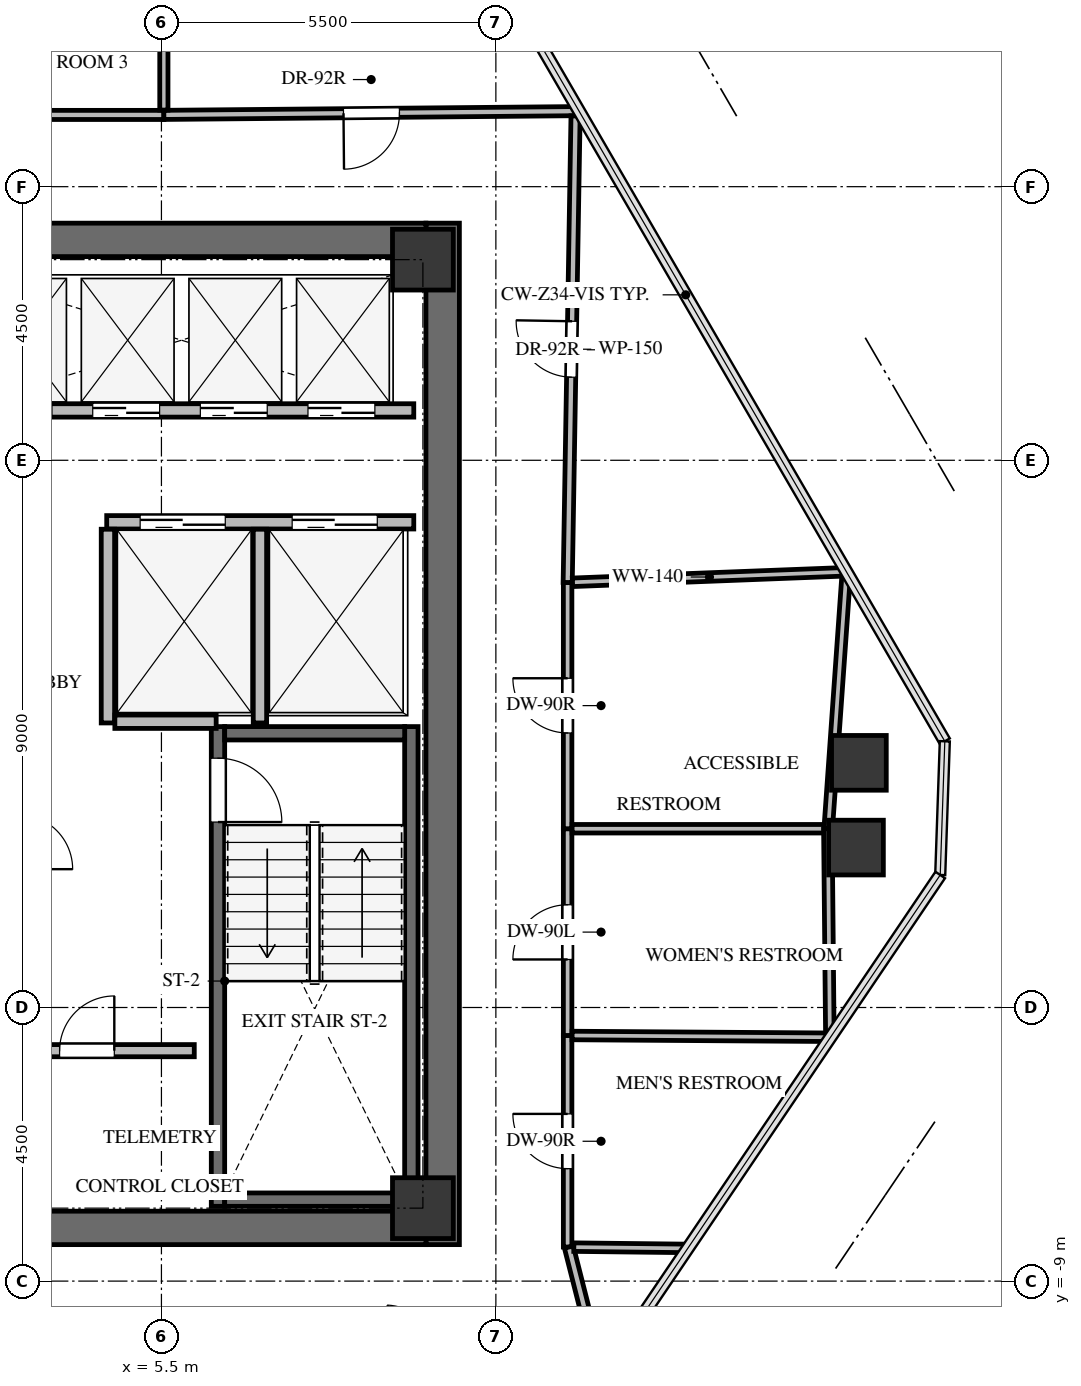
"""IFC4 building model, lengths in metres.
Left out: names, types, materials, properties, quantities, classifications, styles, units other than length and angle.
Written with IfcOpenShell. Run it as: python <this file> out.ifc"""

import sys

from ifc_helpers import new_model, si_unit, direction, frame, frame_2d, origin, origin_2d, place, context, subcontext, project, spatial, rectangle, extrude, source, transform, mapped, element, fill, save


model = new_model("IFC4")
c1 = context("Model", 3, precision=1e-05, world=origin(), true_north=direction((0.0, 1.0)))
c2 = subcontext(c1, "Body", "Model", "MODEL_VIEW")
j1 = project(units=[si_unit("LENGTHUNIT", "METRE"), si_unit("PLANEANGLEUNIT", "RADIAN")], contexts=[c1])
p1 = place(None, origin())
s1 = spatial("IfcSite", under=j1, at=p1, CompositionType="ELEMENT")
p2 = place(p1, origin())
s2 = spatial("IfcBuilding", under=s1, at=p2, CompositionType="ELEMENT")
p3 = place(p2, frame((0.0, 0.0, 258.1)))
s3 = spatial("IfcBuildingStorey", under=s2, at=p3, CompositionType="ELEMENT", Elevation=258.1)
p4 = place(p3, frame((10.125, -8.4, 0.0), z_axis=(0.0, 0.0, 1.0), x_axis=(0.0, 1.0, 0.0)))
e1 = element("IfcWall", 1, at=p4, inside=s3, PredefinedType="SHEAR", context=c2, shape_type="SweptSolid", body=[
    extrude(rectangle(XDim=16.8, YDim=0.55, at=frame_2d((8.4, 0.0))), origin(), (0.0, 0.0, 1.0), 3.4),
])
p5 = place(p3, frame((2.1, -8.125, 0.0), z_axis=(0.0, 0.0, 1.0), x_axis=(1.0, 0.0, 0.0)))
e2 = element("IfcWall", 2, at=p5, inside=s3, PredefinedType="SHEAR", context=c2, shape_type="SweptSolid", body=[
    extrude(rectangle(XDim=7.75, YDim=0.55, at=frame_2d((3.875, 0.0))), origin(), (0.0, 0.0, 1.0), 3.4),
])
p6 = place(p3, frame((-9.85, 8.125, 0.0), z_axis=(0.0, 0.0, 1.0), x_axis=(1.0, 0.0, 0.0)))
e3 = element("IfcWall", 3, at=p6, inside=s3, PredefinedType="SHEAR", context=c2, shape_type="SweptSolid", body=[
    extrude(rectangle(XDim=19.7, YDim=0.55, at=frame_2d((9.85, 0.0))), origin(), (0.0, 0.0, 1.0), 3.4),
])
p7 = place(p3, frame((9.61, -7.77, -0.24), z_axis=(0.0, 0.0, 1.0), x_axis=(0.0, 1.0, 0.0)))
e4 = element("IfcWall", 4, at=p7, inside=s3, PredefinedType="SHEAR", context=c2, shape_type="SweptSolid", body=[
    extrude(rectangle(XDim=7.89, YDim=0.22, at=frame_2d((3.945, 0.0))), origin(), (0.0, 0.0, 1.0), 3.4),
])
p8 = place(p3, frame((6.43, 0.12, -0.24), z_axis=(0.0, 0.0, 1.0), x_axis=(0.0, -1.0, 0.0)))
e5 = element("IfcWall", 5, at=p8, inside=s3, PredefinedType="SHEAR", context=c2, shape_type="SweptSolid", body=[
    extrude(rectangle(XDim=7.89, YDim=0.22, at=frame_2d((3.945, 0.0))), origin(), (0.0, 0.0, 1.0), 3.4),
])
p9 = place(p8, frame((0.52, 0.0, 0.0)))
e6 = element("IfcOpeningElement", 6, at=p9, cuts=e5, PredefinedType="OPENING", context=c2, shape_type="SweptSolid", body=[
    extrude(rectangle(XDim=1.05, YDim=2.15, at=frame_2d((0.525, 1.075))), frame((0.0, 0.12, 0.0), z_axis=(0.0, -1.0, 0.0), x_axis=(1.0, 0.0, 0.0)), (0.0, 0.0, 1.0), 0.24),
])
for number, where, z_axis, x_axis in (
    (7, (6.54, -7.66, -0.24), (0.0, 0.0, 1.0), (1.0, 0.0, 0.0)),
    (8, (9.5, 0.01, -0.24), (0.0, 0.0, 1.0), (-1.0, 0.0, 0.0)),
):
    element("IfcWall", number, at=place(p3, frame(where, z_axis=z_axis, x_axis=x_axis)), inside=s3, PredefinedType="SHEAR", context=c2, shape_type="SweptSolid", body=[
        extrude(rectangle(XDim=2.96, YDim=0.22, at=frame_2d((1.48, 0.0))), origin(), (0.0, 0.0, 1.0), 3.4),
    ])
m1 = source(origin(), c2, "Body", "SweptSolid", [
    extrude(rectangle(XDim=1.0, YDim=1.0, at=origin_2d()), origin(), (0.0, 0.0, 1.0), 3.4),
])
for number, where, z_axis, x_axis in (
    (9, (9.8, -7.8, -0.24), (0.0, 0.0, 1.0), (1.0, 0.0, 0.0)),
    (10, (9.8, 7.8, -0.24), (0.0, 0.0, 1.0), (1.0, 0.0, 0.0)),
):
    element("IfcColumn", number, at=place(p3, frame(where, z_axis=z_axis, x_axis=x_axis)), inside=s3, PredefinedType="COLUMN", context=c2, shape_type="MappedRepresentation", body=[
        mapped(m1, transform((0.0, 0.0, 0.0), x_axis=(1.0, 0.0, 0.0), y_axis=(0.0, 1.0, 0.0), z_axis=(0.0, 0.0, 1.0), scale=1.0)),
    ])
m2 = source(origin(), c2, "Body", "SweptSolid", [
    extrude(rectangle(XDim=0.9, YDim=0.9, at=origin_2d()), origin(), (0.0, 0.0, 1.0), 3.4),
])
for number, where, z_axis, x_axis in (
    (11, (16.97, -0.476, -0.24), (0.0, 0.0, 1.0), (1.0, 0.0, 0.0)),
    (12, (16.922, -1.87, -0.24), (0.0, 0.0, 1.0), (1.0, 0.0, 0.0)),
):
    element("IfcColumn", number, at=place(p3, frame(where, z_axis=z_axis, x_axis=x_axis)), inside=s3, PredefinedType="COLUMN", context=c2, shape_type="MappedRepresentation", body=[
        mapped(m2, transform((0.0, 0.0, 0.0), x_axis=(1.0, 0.0, 0.0), y_axis=(0.0, 1.0, 0.0), z_axis=(0.0, 0.0, 1.0), scale=1.0)),
    ])
p10 = place(p3, frame((4.6, 3.48, 0.0), z_axis=(0.0, 0.0, 1.0), x_axis=(1.0, 0.0, 0.0)))
e13 = element("IfcWall", 13, at=p10, inside=s3, PredefinedType="SOLIDWALL", context=c2, shape_type="SweptSolid", body=[
    extrude(rectangle(XDim=5.05, YDim=0.22, at=frame_2d((2.525, 0.0))), origin(), (0.0, 0.0, 1.0), 3.145),
])
p11 = place(p10, frame((0.55, 0.0, 0.0)))
e14 = element("IfcOpeningElement", 14, at=p11, cuts=e13, PredefinedType="OPENING", context=c2, shape_type="SweptSolid", body=[
    extrude(rectangle(XDim=1.4, YDim=2.15, at=frame_2d((0.7, 1.075))), frame((0.0, 0.12, 0.0), z_axis=(0.0, -1.0, 0.0), x_axis=(1.0, 0.0, 0.0)), (0.0, 0.0, 1.0), 0.24),
])
p12 = place(p10, frame((3.05, 0.0, 0.0)))
e15 = element("IfcOpeningElement", 15, at=p12, cuts=e13, PredefinedType="OPENING", context=c2, shape_type="SweptSolid", body=[
    extrude(rectangle(XDim=1.4, YDim=2.15, at=frame_2d((0.7, 1.075))), frame((0.0, 0.12, 0.0), z_axis=(0.0, -1.0, 0.0), x_axis=(1.0, 0.0, 0.0)), (0.0, 0.0, 1.0), 0.24),
])
for number, where, z_axis, x_axis in (
    (16, (4.62, 0.18, 0.0), (0.0, 0.0, 1.0), (0.0, 1.0, 0.0)),
    (17, (7.12, 0.18, 0.0), (0.0, 0.0, 1.0), (0.0, 1.0, 0.0)),
):
    element("IfcWall", number, at=place(p3, frame(where, z_axis=z_axis, x_axis=x_axis)), inside=s3, PredefinedType="SOLIDWALL", context=c2, shape_type="SweptSolid", body=[
        extrude(rectangle(XDim=3.186, YDim=0.22, at=frame_2d((1.593, 0.0))), origin(), (0.0, 0.0, 1.0), 3.145),
    ])
p13 = place(p3, frame((4.734, 0.2, 0.0), z_axis=(0.0, 0.0, 1.0), x_axis=(1.0, 0.0, 0.0)))
e18 = element("IfcWall", 18, at=p13, inside=s3, PredefinedType="SOLIDWALL", context=c2, shape_type="SweptSolid", body=[
    extrude(rectangle(XDim=1.666, YDim=0.22, at=frame_2d((0.833, 0.0))), origin(), (0.0, 0.0, 1.0), 3.145),
])
p14 = place(p3, frame((2.325, 5.32, 0.0), z_axis=(0.0, 0.0, 1.0), x_axis=(1.0, 0.0, 0.0)))
e19 = element("IfcWall", 19, at=p14, inside=s3, PredefinedType="SOLIDWALL", context=c2, shape_type="SweptSolid", body=[
    extrude(rectangle(XDim=7.325, YDim=0.22, at=frame_2d((3.663, 0.0))), origin(), (0.0, 0.0, 1.0), 3.145),
])
p15 = place(p14, frame((0.275, 0.0, 0.0)))
e20 = element("IfcOpeningElement", 20, at=p15, cuts=e19, PredefinedType="OPENING", context=c2, shape_type="SweptSolid", body=[
    extrude(rectangle(XDim=1.1, YDim=2.15, at=frame_2d((0.55, 1.075))), frame((0.0, 0.12, 0.0), z_axis=(0.0, -1.0, 0.0), x_axis=(1.0, 0.0, 0.0)), (0.0, 0.0, 1.0), 0.24),
])
p16 = place(p14, frame((2.045, 0.0, 0.0)))
e21 = element("IfcOpeningElement", 21, at=p16, cuts=e19, PredefinedType="OPENING", context=c2, shape_type="SweptSolid", body=[
    extrude(rectangle(XDim=1.1, YDim=2.15, at=frame_2d((0.55, 1.075))), frame((0.0, 0.12, 0.0), z_axis=(0.0, -1.0, 0.0), x_axis=(1.0, 0.0, 0.0)), (0.0, 0.0, 1.0), 0.24),
])
p17 = place(p14, frame((3.815, 0.0, 0.0)))
e22 = element("IfcOpeningElement", 22, at=p17, cuts=e19, PredefinedType="OPENING", context=c2, shape_type="SweptSolid", body=[
    extrude(rectangle(XDim=1.1, YDim=2.15, at=frame_2d((0.55, 1.075))), frame((0.0, 0.12, 0.0), z_axis=(0.0, -1.0, 0.0), x_axis=(1.0, 0.0, 0.0)), (0.0, 0.0, 1.0), 0.24),
])
p18 = place(p14, frame((5.585, 0.0, 0.0)))
e23 = element("IfcOpeningElement", 23, at=p18, cuts=e19, PredefinedType="OPENING", context=c2, shape_type="SweptSolid", body=[
    extrude(rectangle(XDim=1.1, YDim=2.15, at=frame_2d((0.55, 1.075))), frame((0.0, 0.12, 0.0), z_axis=(0.0, -1.0, 0.0), x_axis=(1.0, 0.0, 0.0)), (0.0, 0.0, 1.0), 0.24),
])
p19 = place(p3, frame((2.51, -5.21, 0.0), z_axis=(0.0, 0.0, 1.0), x_axis=(1.0, 0.0, 0.0)))
e24 = element("IfcWall", 24, at=p19, inside=s3, PredefinedType="SOLIDWALL", context=c2, shape_type="SweptSolid", body=[
    extrude(rectangle(XDim=3.53, YDim=0.2, at=frame_2d((1.765, 0.0))), origin(), (0.0, 0.0, 1.0), 3.145),
])
p20 = place(p19, frame((1.315, 0.0, 0.0)))
e25 = element("IfcOpeningElement", 25, at=p20, cuts=e24, PredefinedType="OPENING", context=c2, shape_type="SweptSolid", body=[
    extrude(rectangle(XDim=0.9, YDim=2.05, at=frame_2d((0.45, 1.025))), frame((0.0, 0.11, 0.0), z_axis=(0.0, -1.0, 0.0), x_axis=(1.0, 0.0, 0.0)), (0.0, 0.0, 1.0), 0.22),
])
p21 = place(p3, frame((12.18, -8.44, 0.0), z_axis=(0.0, 0.0, 1.0), x_axis=(0.0, 1.0, 0.0)))
e26 = element("IfcWall", 26, at=p21, inside=s3, PredefinedType="PARTITIONING", context=c2, shape_type="SweptSolid", body=[
    extrude(rectangle(XDim=3.48, YDim=0.14, at=frame_2d((1.74, 0.0))), origin(), (0.0, 0.0, 1.0), 2.499),
])
p22 = place(p21, frame((1.29, 0.0, 0.0)))
e27 = element("IfcOpeningElement", 27, at=p22, cuts=e26, PredefinedType="OPENING", context=c2, shape_type="SweptSolid", body=[
    extrude(rectangle(XDim=0.9, YDim=2.05, at=frame_2d((0.45, 1.025))), frame((0.0, 0.08, 0.0), z_axis=(0.0, -1.0, 0.0), x_axis=(1.0, 0.0, 0.0)), (0.0, 0.0, 1.0), 0.16),
])
p23 = place(p3, frame((12.18, -4.96, 0.0), z_axis=(0.0, 0.0, 1.0), x_axis=(0.0, 1.0, 0.0)))
e28 = element("IfcWall", 28, at=p23, inside=s3, PredefinedType="PARTITIONING", context=c2, shape_type="SweptSolid", body=[
    extrude(rectangle(XDim=3.4, YDim=0.14, at=frame_2d((1.7, 0.0))), origin(), (0.0, 0.0, 1.0), 3.145),
])
p24 = place(p23, frame((1.25, 0.0, 0.0)))
e29 = element("IfcOpeningElement", 29, at=p24, cuts=e28, PredefinedType="OPENING", context=c2, shape_type="SweptSolid", body=[
    extrude(rectangle(XDim=0.9, YDim=2.05, at=frame_2d((0.45, 1.025))), frame((0.0, 0.08, 0.0), z_axis=(0.0, -1.0, 0.0), x_axis=(1.0, 0.0, 0.0)), (0.0, 0.0, 1.0), 0.16),
])
p25 = place(p3, frame((12.18, -1.56, 0.0), z_axis=(0.0, 0.0, 1.0), x_axis=(0.0, 1.0, 0.0)))
e30 = element("IfcWall", 30, at=p25, inside=s3, PredefinedType="PARTITIONING", context=c2, shape_type="SweptSolid", body=[
    extrude(rectangle(XDim=4.05, YDim=0.14, at=frame_2d((2.025, 0.0))), origin(), (0.0, 0.0, 1.0), 2.401),
])
p26 = place(p25, frame((1.575, 0.0, 0.0)))
e31 = element("IfcOpeningElement", 31, at=p26, cuts=e30, PredefinedType="OPENING", context=c2, shape_type="SweptSolid", body=[
    extrude(rectangle(XDim=0.9, YDim=2.05, at=frame_2d((0.45, 1.025))), frame((0.0, 0.08, 0.0), z_axis=(0.0, -1.0, 0.0), x_axis=(1.0, 0.0, 0.0)), (0.0, 0.0, 1.0), 0.16),
])
p27 = place(p3, frame((5.54, 10.18, 0.0), z_axis=(0.0, 0.0, 1.0), x_axis=(-1.0, 0.0, 0.0)))
e32 = element("IfcWall", 32, at=p27, inside=s3, PredefinedType="PARTITIONING", context=c2, shape_type="SweptSolid", body=[
    extrude(rectangle(XDim=4.451, YDim=0.15, at=frame_2d((2.226, 0.0))), origin(), (0.0, 0.0, 1.0), 2.708),
])
p28 = place(p3, frame((12.368, 10.243, 0.0), z_axis=(0.0, 0.0, 1.0), x_axis=(-0.999958440586, -0.009116858034, 0.0)))
e33 = element("IfcWall", 33, at=p28, inside=s3, PredefinedType="PARTITIONING", context=c2, shape_type="SweptSolid", body=[
    extrude(rectangle(XDim=6.829, YDim=0.15, at=frame_2d((3.414, 0.0))), origin(), (0.0, 0.0, 1.0), 2.401),
])
p29 = place(p28, frame((2.954, 0.0, 0.0)))
e34 = element("IfcOpeningElement", 34, at=p29, cuts=e33, PredefinedType="OPENING", context=c2, shape_type="SweptSolid", body=[
    extrude(rectangle(XDim=0.92, YDim=2.1, at=frame_2d((0.46, 1.05))), frame((0.0, 0.085, 0.0), z_axis=(0.0, -1.0, 0.0), x_axis=(1.0, 0.0, 0.0)), (0.0, 0.0, 1.0), 0.17),
])
p30 = place(p3, frame((12.719, -10.477, 0.0), z_axis=(0.0, 0.0, 1.0), x_axis=(-0.246550381988, 0.96912997536, 0.0)))
e35 = element("IfcWall", 35, at=p30, inside=s3, PredefinedType="PARTITIONING", context=c2, shape_type="SweptSolid", body=[
    extrude(rectangle(XDim=2.102, YDim=0.15, at=frame_2d((1.051, 0.0))), origin(), (0.0, 0.0, 1.0), 2.499),
])
p31 = place(p3, frame((12.181, 2.49, 0.0), z_axis=(0.0, 0.0, 1.0), x_axis=(0.016828669653, 0.999858387912, 0.0)))
e36 = element("IfcWall", 36, at=p31, inside=s3, PredefinedType="PARTITIONING", context=c2, shape_type="SweptSolid", body=[
    extrude(rectangle(XDim=7.674, YDim=0.15, at=frame_2d((3.837, 0.0))), origin(), (0.0, 0.0, 1.0), 2.499),
])
p32 = place(p31, frame((3.377, 0.0, 0.0)))
e37 = element("IfcOpeningElement", 37, at=p32, cuts=e36, PredefinedType="OPENING", context=c2, shape_type="SweptSolid", body=[
    extrude(rectangle(XDim=0.92, YDim=2.1, at=frame_2d((0.46, 1.05))), frame((0.0, 0.085, 0.0), z_axis=(0.0, -1.0, 0.0), x_axis=(1.0, 0.0, 0.0)), (0.0, 0.0, 1.0), 0.17),
])
p33 = place(p3, frame((12.254, -4.96, 0.0), z_axis=(0.0, 0.0, 1.0), x_axis=(0.999976630429, -0.006836563198, 0.0)))
e38 = element("IfcWall", 38, at=p33, inside=s3, PredefinedType="PARTITIONING", context=c2, shape_type="SweptSolid", body=[
    extrude(rectangle(XDim=4.25, YDim=0.14, at=frame_2d((2.125, 0.0))), origin(), (0.0, 0.0, 1.0), 2.499),
])
p34 = place(p3, frame((14.156, -8.462, 0.0), z_axis=(0.0, 0.0, 1.0), x_axis=(-0.999935742613, 0.011336253532, 0.0)))
e39 = element("IfcWall", 39, at=p34, inside=s3, PredefinedType="PARTITIONING", context=c2, shape_type="SweptSolid", body=[
    extrude(rectangle(XDim=1.874, YDim=0.14, at=frame_2d((0.937, 0.0))), origin(), (0.0, 0.0, 1.0), 2.499),
])
p35 = place(p3, frame((12.254, -1.56, 0.0), z_axis=(0.0, 0.0, 1.0), x_axis=(1.0, 0.0, 0.0)))
e40 = element("IfcWall", 40, at=p35, inside=s3, PredefinedType="PARTITIONING", context=c2, shape_type="SweptSolid", body=[
    extrude(rectangle(XDim=4.206, YDim=0.14, at=frame_2d((2.103, 0.0))), origin(), (0.0, 0.0, 1.0), 2.401),
])
p36 = place(p3, frame((16.46, -1.56, 0.0), z_axis=(0.0, 0.0, 1.0), x_axis=(0.009604446748, -0.999953876238, 0.0)))
e41 = element("IfcWall", 41, at=p36, inside=s3, PredefinedType="PARTITIONING", context=c2, shape_type="SweptSolid", body=[
    extrude(rectangle(XDim=3.355, YDim=0.14, at=frame_2d((1.678, 0.0))), origin(), (0.0, 0.0, 1.0), 2.401),
])
p37 = place(p3, frame((12.26, 2.493, 0.0), z_axis=(0.0, 0.0, 1.0), x_axis=(0.999256206289, 0.038562082324, 0.0)))
e42 = element("IfcWall", 42, at=p37, inside=s3, PredefinedType="PARTITIONING", context=c2, shape_type="SweptSolid", body=[
    extrude(rectangle(XDim=4.508, YDim=0.14, at=frame_2d((2.254, 0.0))), origin(), (0.0, 0.0, 1.0), 2.499),
])
p38 = place(p3, frame((16.76, 2.593, 0.0), z_axis=(0.0, 0.0, 1.0), x_axis=(-0.07055102187, -0.997508172053, 0.0)))
e43 = element("IfcWall", 43, at=p38, inside=s3, PredefinedType="PARTITIONING", context=c2, shape_type="SweptSolid", body=[
    extrude(rectangle(XDim=4.163, YDim=0.14, at=frame_2d((2.082, 0.0))), origin(), (0.0, 0.0, 1.0), 2.401),
])
p39 = place(p3, frame((5.54, 15.662, 0.0), z_axis=(0.0, 0.0, 1.0), x_axis=(0.0, -1.0, 0.0)))
e44 = element("IfcWall", 44, at=p39, inside=s3, PredefinedType="PARTITIONING", context=c2, shape_type="SweptSolid", body=[
    extrude(rectangle(XDim=5.402, YDim=0.135, at=frame_2d((2.701, 0.0))), origin(), (0.0, 0.0, 1.0), 2.499),
])
m3 = source(origin(), c2, "Body", "SweptSolid", [
    extrude(rectangle(XDim=1.05, YDim=2.15, at=frame_2d((0.525, 1.075))), frame((0.0, 0.025, 0.0), z_axis=(0.0, -1.0, 0.0), x_axis=(1.0, 0.0, 0.0)), (0.0, 0.0, 1.0), 0.05),
])
p40 = place(p9, origin())
e45 = element("IfcDoor", 45, at=p40, inside=s3, OperationType="SINGLE_SWING_RIGHT", PredefinedType="DOOR", context=c2, shape_type="MappedRepresentation", body=[
    mapped(m3, transform((0.0, 0.0, 0.0), x_axis=(1.0, 0.0, 0.0), y_axis=(0.0, 1.0, 0.0), z_axis=(0.0, 0.0, 1.0), scale=1.0)),
])
fill(e6, e45)
m4 = source(origin(), c2, "Body", "SweptSolid", [
    extrude(rectangle(XDim=1.4, YDim=2.15, at=frame_2d((0.7, 1.075))), frame((0.0, 0.025, 0.0), z_axis=(0.0, -1.0, 0.0), x_axis=(1.0, 0.0, 0.0)), (0.0, 0.0, 1.0), 0.05),
])
p41 = place(p11, origin())
e46 = element("IfcDoor", 46, at=p41, inside=s3, OperationType="DOUBLE_DOOR_SLIDING", PredefinedType="DOOR", context=c2, shape_type="MappedRepresentation", body=[
    mapped(m4, transform((0.0, 0.0, 0.0), x_axis=(1.0, 0.0, 0.0), y_axis=(0.0, 1.0, 0.0), z_axis=(0.0, 0.0, 1.0), scale=1.0)),
])
fill(e14, e46)
p42 = place(p12, origin())
e47 = element("IfcDoor", 47, at=p42, inside=s3, OperationType="DOUBLE_DOOR_SLIDING", PredefinedType="DOOR", context=c2, shape_type="MappedRepresentation", body=[
    mapped(m4, transform((0.0, 0.0, 0.0), x_axis=(1.0, 0.0, 0.0), y_axis=(0.0, 1.0, 0.0), z_axis=(0.0, 0.0, 1.0), scale=1.0)),
])
fill(e15, e47)
m5 = source(origin(), c2, "Body", "SweptSolid", [
    extrude(rectangle(XDim=1.1, YDim=2.15, at=frame_2d((0.55, 1.075))), frame((0.0, 0.025, 0.0), z_axis=(0.0, -1.0, 0.0), x_axis=(1.0, 0.0, 0.0)), (0.0, 0.0, 1.0), 0.05),
])
p43 = place(p16, origin())
e48 = element("IfcDoor", 48, at=p43, inside=s3, OperationType="DOUBLE_DOOR_SLIDING", PredefinedType="DOOR", context=c2, shape_type="MappedRepresentation", body=[
    mapped(m5, transform((0.0, 0.0, 0.0), x_axis=(1.0, 0.0, 0.0), y_axis=(0.0, 1.0, 0.0), z_axis=(0.0, 0.0, 1.0), scale=1.0)),
])
fill(e21, e48)
p44 = place(p17, origin())
e49 = element("IfcDoor", 49, at=p44, inside=s3, OperationType="DOUBLE_DOOR_SLIDING", PredefinedType="DOOR", context=c2, shape_type="MappedRepresentation", body=[
    mapped(m5, transform((0.0, 0.0, 0.0), x_axis=(1.0, 0.0, 0.0), y_axis=(0.0, 1.0, 0.0), z_axis=(0.0, 0.0, 1.0), scale=1.0)),
])
fill(e22, e49)
p45 = place(p18, origin())
e50 = element("IfcDoor", 50, at=p45, inside=s3, OperationType="DOUBLE_DOOR_SLIDING", PredefinedType="DOOR", context=c2, shape_type="MappedRepresentation", body=[
    mapped(m5, transform((0.0, 0.0, 0.0), x_axis=(1.0, 0.0, 0.0), y_axis=(0.0, 1.0, 0.0), z_axis=(0.0, 0.0, 1.0), scale=1.0)),
])
fill(e23, e50)
m6 = source(origin(), c2, "Body", "SweptSolid", [
    extrude(rectangle(XDim=0.9, YDim=2.05, at=frame_2d((0.45, 1.025))), frame((0.0, 0.025, 0.0), z_axis=(0.0, -1.0, 0.0), x_axis=(1.0, 0.0, 0.0)), (0.0, 0.0, 1.0), 0.05),
])
p46 = place(p20, origin())
e51 = element("IfcDoor", 51, at=p46, inside=s3, OperationType="SINGLE_SWING_RIGHT", PredefinedType="DOOR", context=c2, shape_type="MappedRepresentation", body=[
    mapped(m6, transform((0.0, 0.0, 0.0), x_axis=(1.0, 0.0, 0.0), y_axis=(0.0, 1.0, 0.0), z_axis=(0.0, 0.0, 1.0), scale=1.0)),
])
fill(e25, e51)
m7 = source(origin(), c2, "Body", "SweptSolid", [
    extrude(rectangle(XDim=0.9, YDim=2.05, at=frame_2d((0.45, 1.025))), frame((0.0, 0.025, 0.0), z_axis=(0.0, -1.0, 0.0), x_axis=(1.0, 0.0, 0.0)), (0.0, 0.0, 1.0), 0.05),
])
p47 = place(p22, origin())
e52 = element("IfcDoor", 52, at=p47, inside=s3, OperationType="SINGLE_SWING_RIGHT", PredefinedType="DOOR", context=c2, shape_type="MappedRepresentation", body=[
    mapped(m7, transform((0.0, 0.0, 0.0), x_axis=(1.0, 0.0, 0.0), y_axis=(0.0, 1.0, 0.0), z_axis=(0.0, 0.0, 1.0), scale=1.0)),
])
fill(e27, e52)
m8 = source(origin(), c2, "Body", "SweptSolid", [
    extrude(rectangle(XDim=0.9, YDim=2.05, at=frame_2d((0.45, 1.025))), frame((0.0, 0.025, 0.0), z_axis=(0.0, -1.0, 0.0), x_axis=(1.0, 0.0, 0.0)), (0.0, 0.0, 1.0), 0.05),
])
p48 = place(p24, origin())
e53 = element("IfcDoor", 53, at=p48, inside=s3, OperationType="SINGLE_SWING_LEFT", PredefinedType="DOOR", context=c2, shape_type="MappedRepresentation", body=[
    mapped(m8, transform((0.0, 0.0, 0.0), x_axis=(1.0, 0.0, 0.0), y_axis=(0.0, 1.0, 0.0), z_axis=(0.0, 0.0, 1.0), scale=1.0)),
])
fill(e29, e53)
p49 = place(p26, origin())
e54 = element("IfcDoor", 54, at=p49, inside=s3, OperationType="SINGLE_SWING_RIGHT", PredefinedType="DOOR", context=c2, shape_type="MappedRepresentation", body=[
    mapped(m7, transform((0.0, 0.0, 0.0), x_axis=(1.0, 0.0, 0.0), y_axis=(0.0, 1.0, 0.0), z_axis=(0.0, 0.0, 1.0), scale=1.0)),
])
fill(e31, e54)
m9 = source(origin(), c2, "Body", "SweptSolid", [
    extrude(rectangle(XDim=0.92, YDim=2.1, at=frame_2d((0.46, 1.05))), frame((0.0, 0.025, 0.0), z_axis=(0.0, -1.0, 0.0), x_axis=(1.0, 0.0, 0.0)), (0.0, 0.0, 1.0), 0.05),
])
p50 = place(p29, origin())
e55 = element("IfcDoor", 55, at=p50, inside=s3, OperationType="SINGLE_SWING_RIGHT", PredefinedType="DOOR", context=c2, shape_type="MappedRepresentation", body=[
    mapped(m9, transform((0.0, 0.0, 0.0), x_axis=(1.0, 0.0, 0.0), y_axis=(0.0, 1.0, 0.0), z_axis=(0.0, 0.0, 1.0), scale=1.0)),
])
fill(e34, e55)
p51 = place(p32, origin())
e56 = element("IfcDoor", 56, at=p51, inside=s3, OperationType="SINGLE_SWING_RIGHT", PredefinedType="DOOR", context=c2, shape_type="MappedRepresentation", body=[
    mapped(m9, transform((0.0, 0.0, 0.0), x_axis=(1.0, 0.0, 0.0), y_axis=(0.0, 1.0, 0.0), z_axis=(0.0, 0.0, 1.0), scale=1.0)),
])
fill(e37, e56)
save(model, sys.argv[1])
